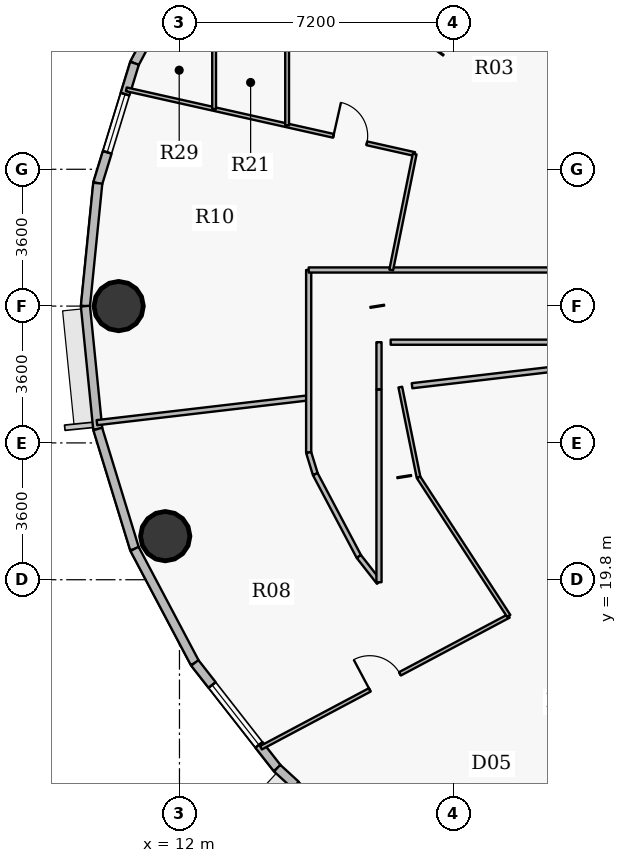
"""IFC4 building model, lengths in metres.
Left out: names, types, materials, properties, quantities, classifications, styles, units other than length and angle.
Written with IfcOpenShell. Run it as: python <this file> out.ifc"""

import sys

from ifc_helpers import new_model, si_unit, direction, frame, frame_2d, origin, origin_2d, place, context, subcontext, project, spatial, rectangle, hollow_circle, extrude, source, transform, mapped, element, fill, save


model = new_model("IFC4")
c1 = context("Model", 3, precision=1e-05, world=origin(), true_north=direction((0.0, 1.0)))
c2 = subcontext(c1, "Body", "Model", "MODEL_VIEW")
j1 = project(units=[si_unit("LENGTHUNIT", "METRE"), si_unit("PLANEANGLEUNIT", "RADIAN")], contexts=[c1])
p1 = place(None, origin())
s1 = spatial("IfcSite", under=j1, at=p1, CompositionType="ELEMENT")
p2 = place(p1, origin())
s2 = spatial("IfcBuilding", under=s1, at=p2, CompositionType="ELEMENT")
p3 = place(p2, frame((0.0, 0.0, 174.9)))
s3 = spatial("IfcBuildingStorey", under=s2, at=p3, CompositionType="ELEMENT", Elevation=174.9)
for number, where, z_axis, x_axis in (
    (1, (10.4, 27.0, 0.0), (0.0, 0.0, 1.0), (1.0, 0.0, 0.0)),
    (2, (11.625, 20.947, 0.0), (0.0, 0.0, 1.0), (1.0, 0.0, 0.0)),
):
    element("IfcColumn", number, at=place(p3, frame(where, z_axis=z_axis, x_axis=x_axis)), inside=s3, PredefinedType="COLUMN", context=c2, shape_type="SweptSolid", body=[
        extrude(hollow_circle(Radius=0.65, WallThickness=0.04, at=origin_2d()), origin(), (0.0, 0.0, 1.0), 3.75),
    ])
p4 = place(p3, frame((10.817, 33.389, 0.0), z_axis=(0.0, 0.0, 1.0), x_axis=(0.467586874938, 0.88394712194, 0.0)))
e3 = element("IfcWall", 3, at=p4, inside=s3, PredefinedType="SOLIDWALL", context=c2, shape_type="SweptSolid", body=[
    extrude(rectangle(XDim=3.393, YDim=0.24, at=frame_2d((1.697, 0.0))), origin(), (0.0, 0.0, 1.0), 3.5),
])
p5 = place(p3, frame((9.85, 30.234, 0.0), z_axis=(0.0, 0.0, 1.0), x_axis=(0.293097995113, 0.956082405058, 0.0)))
e4 = element("IfcWall", 4, at=p5, inside=s3, PredefinedType="SOLIDWALL", context=c2, shape_type="SweptSolid", body=[
    extrude(rectangle(XDim=3.3, YDim=0.24, at=frame_2d((1.65, 0.0))), origin(), (0.0, 0.0, 1.0), 3.5),
])
p6 = place(p5, frame((0.85, 0.0, 0.9)))
e5 = element("IfcOpeningElement", 5, at=p6, cuts=e4, PredefinedType="OPENING", context=c2, shape_type="SweptSolid", body=[
    extrude(rectangle(XDim=1.6, YDim=1.75, at=origin_2d()), frame((0.8, 0.13, 0.875), z_axis=(0.0, -1.0, 0.0), x_axis=(1.0, 0.0, 0.0)), (0.0, 0.0, 1.0), 0.26),
])
for number, where, z_axis, x_axis in (
    (6, (9.525, 27.0, 0.0), (0.0, 0.0, 1.0), (0.1, 0.995, 0.0)),
    (7, (9.85, 23.766, 0.0), (0.0, 0.0, 1.0), (-0.1, 0.995, 0.0)),
):
    element("IfcWall", number, at=place(p3, frame(where, z_axis=z_axis, x_axis=x_axis)), inside=s3, PredefinedType="SOLIDWALL", context=c2, shape_type="SweptSolid", body=[
        extrude(rectangle(XDim=3.25, YDim=0.24, at=frame_2d((1.625, 0.0))), origin(), (0.0, 0.0, 1.0), 3.5),
    ])
p7 = place(p3, frame((10.817, 20.611, 0.0), z_axis=(0.0, 0.0, 1.0), x_axis=(-0.293097995113, 0.956082405058, 0.0)))
e8 = element("IfcWall", 8, at=p7, inside=s3, PredefinedType="SOLIDWALL", context=c2, shape_type="SweptSolid", body=[
    extrude(rectangle(XDim=3.3, YDim=0.24, at=frame_2d((1.65, 0.0))), origin(), (0.0, 0.0, 1.0), 3.5),
])
p8 = place(p3, frame((12.404, 17.612, 0.0), z_axis=(0.0, 0.0, 1.0), x_axis=(-0.467586874938, 0.88394712194, 0.0)))
e9 = element("IfcWall", 9, at=p8, inside=s3, PredefinedType="SOLIDWALL", context=c2, shape_type="SweptSolid", body=[
    extrude(rectangle(XDim=3.393, YDim=0.24, at=frame_2d((1.697, 0.0))), origin(), (0.0, 0.0, 1.0), 3.5),
])
p9 = place(p3, frame((14.572, 14.842, 0.0), z_axis=(0.0, 0.0, 1.0), x_axis=(-0.616287674549, 0.787521112224, 0.0)))
e10 = element("IfcWall", 10, at=p9, inside=s3, PredefinedType="SOLIDWALL", context=c2, shape_type="SweptSolid", body=[
    extrude(rectangle(XDim=3.517, YDim=0.24, at=frame_2d((1.759, 0.0))), origin(), (0.0, 0.0, 1.0), 3.5),
])
p10 = place(p9, frame((0.779, 0.0, 0.9)))
e11 = element("IfcOpeningElement", 11, at=p10, cuts=e10, PredefinedType="OPENING", context=c2, shape_type="SweptSolid", body=[
    extrude(rectangle(XDim=2.0, YDim=1.75, at=origin_2d()), frame((1.0, 0.13, 0.875), z_axis=(0.0, -1.0, 0.0), x_axis=(1.0, 0.0, 0.0)), (0.0, 0.0, 1.0), 0.26),
])
p11 = place(p3, frame((17.268, 12.369, 0.0), z_axis=(0.0, 0.0, 1.0), x_axis=(-0.737076565834, 0.675809245349, 0.0)))
e12 = element("IfcWall", 12, at=p11, inside=s3, PredefinedType="SOLIDWALL", context=c2, shape_type="SweptSolid", body=[
    extrude(rectangle(XDim=3.658, YDim=0.24, at=frame_2d((1.829, 0.0))), origin(), (0.0, 0.0, 1.0), 3.5),
])
p12 = place(p11, frame((1.746, 0.0, 0.9)))
e13 = element("IfcOpeningElement", 13, at=p12, cuts=e12, PredefinedType="OPENING", context=c2, shape_type="SweptSolid", body=[
    extrude(rectangle(XDim=1.25, YDim=1.65, at=origin_2d()), frame((0.625, 0.13, 0.825), z_axis=(0.0, -1.0, 0.0), x_axis=(1.0, 0.0, 0.0)), (0.0, 0.0, 1.0), 0.26),
])
p13 = place(p3, frame((9.828, 23.933, 0.0), z_axis=(0.0, 0.0, 1.0), x_axis=(0.993205157511, 0.116376608877, 0.0)))
e14 = element("IfcWall", 14, at=p13, inside=s3, PredefinedType="PARTITIONING", context=c2, shape_type="SweptSolid", body=[
    extrude(rectangle(XDim=5.61, YDim=0.135, at=frame_2d((2.805, 0.0))), origin(), (0.0, 0.0, 1.0), 2.935),
])
p14 = place(p3, frame((10.602, 32.704, 0.0), z_axis=(0.0, 0.0, 1.0), x_axis=(0.9756977614, -0.21912069368, 0.0)))
e15 = element("IfcWall", 15, at=p14, inside=s3, PredefinedType="PARTITIONING", context=c2, shape_type="SweptSolid", body=[
    extrude(rectangle(XDim=7.776, YDim=0.1, at=frame_2d((3.888, 0.0))), origin(), (0.0, 0.0, 1.0), 2.935),
])
p15 = place(p14, frame((5.586, 0.0, 0.0)))
e16 = element("IfcOpeningElement", 16, at=p15, cuts=e15, PredefinedType="OPENING", context=c2, shape_type="SweptSolid", body=[
    extrude(rectangle(XDim=0.9, YDim=2.1, at=origin_2d()), frame((0.45, 0.06, 1.05), z_axis=(0.0, -1.0, 0.0), x_axis=(1.0, 0.0, 0.0)), (0.0, 0.0, 1.0), 0.12),
])
p16 = place(p3, frame((12.912, 32.185, 0.0), z_axis=(0.0, 0.0, 1.0), x_axis=(0.0, 1.0, 0.0)))
e17 = element("IfcWall", 17, at=p16, inside=s3, PredefinedType="PARTITIONING", context=c2, shape_type="SweptSolid", body=[
    extrude(rectangle(XDim=4.86, YDim=0.1, at=frame_2d((2.43, 0.0))), origin(), (0.0, 0.0, 1.0), 2.935),
])
p17 = place(p16, frame((2.02, 0.0, 0.0)))
e18 = element("IfcOpeningElement", 18, at=p17, cuts=e17, PredefinedType="OPENING", context=c2, shape_type="SweptSolid", body=[
    extrude(rectangle(XDim=0.82, YDim=2.1, at=origin_2d()), frame((0.41, 0.06, 1.05), z_axis=(0.0, -1.0, 0.0), x_axis=(1.0, 0.0, 0.0)), (0.0, 0.0, 1.0), 0.12),
])
p18 = place(p3, frame((14.145, 15.379, 0.0), z_axis=(0.0, 0.0, 1.0), x_axis=(0.882946160832, 0.469474256027, 0.0)))
e19 = element("IfcWall", 19, at=p18, inside=s3, PredefinedType="PARTITIONING", context=c2, shape_type="SweptSolid", body=[
    extrude(rectangle(XDim=7.385, YDim=0.1, at=frame_2d((3.692, 0.0))), origin(), (0.0, 0.0, 1.0), 2.935),
])
p19 = place(p18, frame((3.242, 0.0, 0.0)))
e20 = element("IfcOpeningElement", 20, at=p19, cuts=e19, PredefinedType="OPENING", context=c2, shape_type="SweptSolid", body=[
    extrude(rectangle(XDim=0.9, YDim=2.1, at=origin_2d()), frame((0.45, 0.06, 1.05), z_axis=(0.0, -1.0, 0.0), x_axis=(1.0, 0.0, 0.0)), (0.0, 0.0, 1.0), 0.12),
])
p20 = place(p3, frame((14.833, 31.754, 0.0), z_axis=(0.0, 0.0, 1.0), x_axis=(0.0, 1.0, 0.0)))
e21 = element("IfcWall", 21, at=p20, inside=s3, PredefinedType="PARTITIONING", context=c2, shape_type="SweptSolid", body=[
    extrude(rectangle(XDim=7.651, YDim=0.1, at=frame_2d((3.825, 0.0))), origin(), (0.0, 0.0, 1.0), 2.935),
])
p21 = place(p20, frame((2.399, 0.0, 0.0)))
e22 = element("IfcOpeningElement", 22, at=p21, cuts=e21, PredefinedType="OPENING", context=c2, shape_type="SweptSolid", body=[
    extrude(rectangle(XDim=0.9, YDim=2.1, at=origin_2d()), frame((0.45, 0.06, 1.05), z_axis=(0.0, -1.0, 0.0), x_axis=(1.0, 0.0, 0.0)), (0.0, 0.0, 1.0), 0.12),
])
p22 = place(p3, frame((15.4, 23.146, 0.0), z_axis=(0.0, 0.0, 1.0), x_axis=(0.0, 1.0, 0.0)))
e23 = element("IfcWall", 23, at=p22, inside=s3, PredefinedType="PARTITIONING", context=c2, shape_type="SweptSolid", body=[
    extrude(rectangle(XDim=4.804, YDim=0.135, at=frame_2d((2.402, 0.0))), origin(), (0.0, 0.0, 1.0), 2.935),
])
p23 = place(p3, frame((15.4, 23.146, 0.0), z_axis=(0.0, 0.0, 1.0), x_axis=(0.293335154151, -0.956009669061, 0.0)))
e24 = element("IfcWall", 24, at=p23, inside=s3, PredefinedType="PARTITIONING", context=c2, shape_type="SweptSolid", body=[
    extrude(rectangle(XDim=0.594, YDim=0.135, at=frame_2d((0.297, 0.0))), origin(), (0.0, 0.0, 1.0), 3.5),
])
p24 = place(p3, frame((15.4, 27.95, 0.0), z_axis=(0.0, 0.0, 1.0), x_axis=(1.0, 0.0, 0.0)))
e25 = element("IfcWall", 25, at=p24, inside=s3, PredefinedType="PARTITIONING", context=c2, shape_type="SweptSolid", body=[
    extrude(rectangle(XDim=8.95, YDim=0.135, at=frame_2d((4.475, 0.0))), origin(), (0.0, 0.0, 1.0), 3.5),
])
p25 = place(p3, frame((15.574, 22.578, 0.0), z_axis=(0.0, 0.0, 1.0), x_axis=(0.46757196543, -0.883955008552, 0.0)))
e26 = element("IfcWall", 26, at=p25, inside=s3, PredefinedType="PARTITIONING", context=c2, shape_type="SweptSolid", body=[
    extrude(rectangle(XDim=2.451, YDim=0.135, at=frame_2d((1.226, 0.0))), origin(), (0.0, 0.0, 1.0), 2.935),
])
p26 = place(p3, frame((16.72, 20.411, 0.0), z_axis=(0.0, 0.0, 1.0), x_axis=(0.616377221056, -0.787451027914, 0.0)))
e27 = element("IfcWall", 27, at=p26, inside=s3, PredefinedType="PARTITIONING", context=c2, shape_type="SweptSolid", body=[
    extrude(rectangle(XDim=0.859, YDim=0.135, at=frame_2d((0.43, 0.0))), origin(), (0.0, 0.0, 1.0), 3.5),
])
p27 = place(p3, frame((17.25, 19.734, 0.0), z_axis=(0.0, 0.0, 1.0), x_axis=(0.0, 1.0, 0.0)))
e28 = element("IfcWall", 28, at=p27, inside=s3, PredefinedType="PARTITIONING", context=c2, shape_type="SweptSolid", body=[
    extrude(rectangle(XDim=5.068, YDim=0.135, at=frame_2d((2.534, 0.0))), origin(), (0.0, 0.0, 1.0), 2.935),
])
p28 = place(p3, frame((17.572, 27.95, 0.0), z_axis=(0.0, 0.0, 1.0), x_axis=(0.19818274337, 0.980165088253, 0.0)))
e29 = element("IfcWall", 29, at=p28, inside=s3, PredefinedType="PARTITIONING", context=c2, shape_type="SweptSolid", body=[
    extrude(rectangle(XDim=3.112, YDim=0.1, at=frame_2d((1.556, 0.0))), origin(), (0.0, 0.0, 1.0), 3.5),
])
p29 = place(p3, frame((17.811, 24.868, 0.0), z_axis=(0.0, 0.0, 1.0), x_axis=(0.198247700743, -0.980151952072, 0.0)))
e30 = element("IfcWall", 30, at=p29, inside=s3, PredefinedType="PARTITIONING", context=c2, shape_type="SweptSolid", body=[
    extrude(rectangle(XDim=2.422, YDim=0.1, at=frame_2d((1.211, 0.0))), origin(), (0.0, 0.0, 1.0), 2.935),
])
p30 = place(p3, frame((18.291, 22.494, 0.0), z_axis=(0.0, 0.0, 1.0), x_axis=(0.545410225271, -0.838169246734, 0.0)))
e31 = element("IfcWall", 31, at=p30, inside=s3, PredefinedType="PARTITIONING", context=c2, shape_type="SweptSolid", body=[
    extrude(rectangle(XDim=4.352, YDim=0.1, at=frame_2d((2.176, 0.0))), origin(), (0.0, 0.0, 1.0), 2.935),
])
p31 = place(p3, frame((21.259, 9.852, 0.0), z_axis=(0.0, 0.0, 1.0), x_axis=(0.651889454341, 0.758314011026, 0.0)))
e32 = element("IfcWall", 32, at=p31, inside=s3, PredefinedType="PARTITIONING", context=c2, shape_type="SweptSolid", body=[
    extrude(rectangle(XDim=10.942, YDim=0.135, at=frame_2d((5.471, 0.0))), origin(), (0.0, 0.0, 1.0), 2.935),
])
p32 = place(p3, frame((17.25, 26.05, 0.0), z_axis=(0.0, 0.0, 1.0), x_axis=(0.0, -1.0, 0.0)))
e33 = element("IfcWall", 33, at=p32, inside=s3, PredefinedType="PARTITIONING", context=c2, shape_type="SweptSolid", body=[
    extrude(rectangle(XDim=1.238, YDim=0.135, at=frame_2d((0.619, 0.0))), origin(), (0.0, 0.0, 1.0), 3.185),
])
p33 = place(p3, frame((24.042, 26.05, 0.0), z_axis=(0.0, 0.0, 1.0), x_axis=(-1.0, 0.0, 0.0)))
e34 = element("IfcWall", 34, at=p33, inside=s3, PredefinedType="PARTITIONING", context=c2, shape_type="SweptSolid", body=[
    extrude(rectangle(XDim=6.485, YDim=0.135, at=frame_2d((3.242, 0.0))), origin(), (0.0, 0.0, 1.0), 3.5),
])
p34 = place(p3, frame((18.12, 24.905, 0.0), z_axis=(0.0, 0.0, 1.0), x_axis=(0.993204061109, 0.116385965632, 0.0)))
e35 = element("IfcWall", 35, at=p34, inside=s3, PredefinedType="PARTITIONING", context=c2, shape_type="SweptSolid", body=[
    extrude(rectangle(XDim=5.943, YDim=0.135, at=frame_2d((2.971, 0.0))), origin(), (0.0, 0.0, 1.0), 3.5),
])
m1 = source(origin(), c2, "Body", "SweptSolid", [
    extrude(rectangle(XDim=1.6, YDim=1.75, at=origin_2d()), frame((0.8, 0.03, 0.875), z_axis=(0.0, -1.0, 0.0), x_axis=(1.0, 0.0, 0.0)), (0.0, 0.0, 1.0), 0.06),
])
p35 = place(p6, origin())
e36 = element("IfcWindow", 36, at=p35, inside=s3, PartitioningType="DOUBLE_PANEL_VERTICAL", PredefinedType="WINDOW", context=c2, shape_type="MappedRepresentation", body=[
    mapped(m1, transform((0.0, 0.0, 0.0), x_axis=(1.0, 0.0, 0.0), y_axis=(0.0, 1.0, 0.0), z_axis=(0.0, 0.0, 1.0), scale=1.0)),
])
fill(e5, e36)
m2 = source(origin(), c2, "Body", "SweptSolid", [
    extrude(rectangle(XDim=2.0, YDim=1.75, at=origin_2d()), frame((1.0, 0.03, 0.875), z_axis=(0.0, -1.0, 0.0), x_axis=(1.0, 0.0, 0.0)), (0.0, 0.0, 1.0), 0.06),
])
p36 = place(p10, origin())
e37 = element("IfcWindow", 37, at=p36, inside=s3, PartitioningType="DOUBLE_PANEL_VERTICAL", PredefinedType="WINDOW", context=c2, shape_type="MappedRepresentation", body=[
    mapped(m2, transform((0.0, 0.0, 0.0), x_axis=(1.0, 0.0, 0.0), y_axis=(0.0, 1.0, 0.0), z_axis=(0.0, 0.0, 1.0), scale=1.0)),
])
fill(e11, e37)
m3 = source(origin(), c2, "Body", "SweptSolid", [
    extrude(rectangle(XDim=0.9, YDim=2.1, at=origin_2d()), frame((0.45, 0.025, 1.05), z_axis=(0.0, -1.0, 0.0), x_axis=(1.0, 0.0, 0.0)), (0.0, 0.0, 1.0), 0.05),
])
p37 = place(p15, origin())
e38 = element("IfcDoor", 38, at=p37, inside=s3, OperationType="SINGLE_SWING_LEFT", PredefinedType="DOOR", context=c2, shape_type="MappedRepresentation", body=[
    mapped(m3, transform((0.0, 0.0, 0.0), x_axis=(1.0, 0.0, 0.0), y_axis=(0.0, 1.0, 0.0), z_axis=(0.0, 0.0, 1.0), scale=1.0)),
])
fill(e16, e38)
p38 = place(p19, origin())
e39 = element("IfcDoor", 39, at=p38, inside=s3, OperationType="SINGLE_SWING_LEFT", PredefinedType="DOOR", context=c2, shape_type="MappedRepresentation", body=[
    mapped(m3, transform((0.0, 0.0, 0.0), x_axis=(1.0, 0.0, 0.0), y_axis=(0.0, 1.0, 0.0), z_axis=(0.0, 0.0, 1.0), scale=1.0)),
])
fill(e20, e39)
save(model, sys.argv[1])
